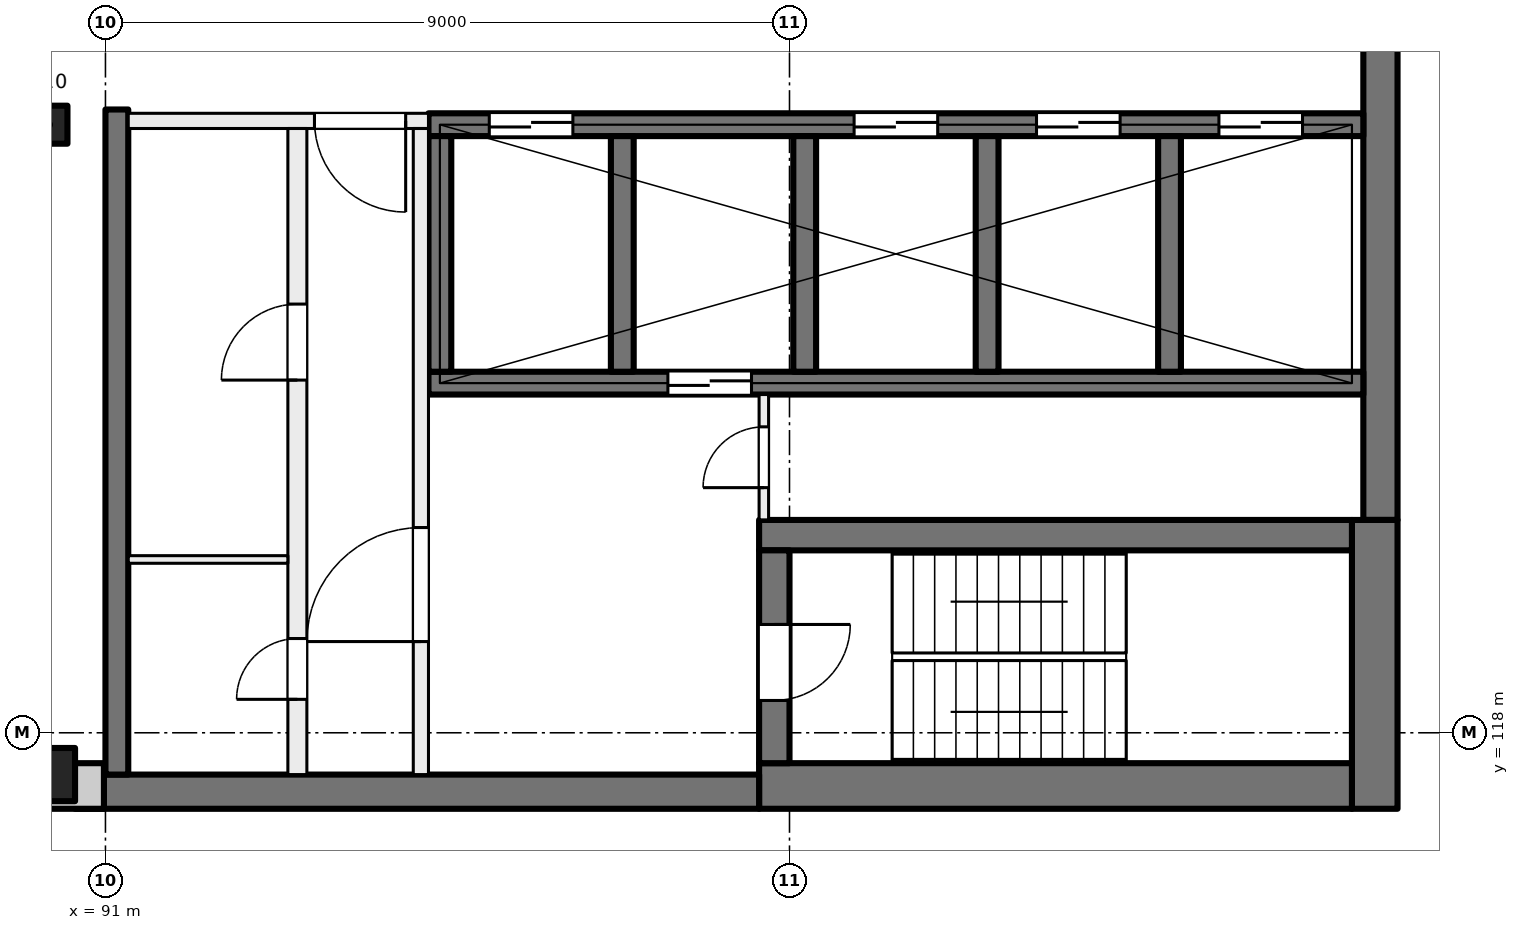
"""IFC4 building model, lengths in metres.
Left out: names, types, materials, properties, quantities, classifications, styles, units other than length and angle.
Written with IfcOpenShell. Run it as: python <this file> out.ifc"""

import sys

from ifc_helpers import new_model, si_unit, direction, frame, frame_2d, origin, origin_2d, place, context, subcontext, project, spatial, rectangle, extrude, element, fill, save


model = new_model("IFC4")
c1 = context("Model", 3, precision=1e-05, world=origin(), true_north=direction((0.0, 1.0)))
c2 = subcontext(c1, "Body", "Model", "MODEL_VIEW")
j1 = project(units=[si_unit("LENGTHUNIT", "METRE"), si_unit("PLANEANGLEUNIT", "RADIAN")], contexts=[c1])
p1 = place(None, origin())
s1 = spatial("IfcSite", under=j1, at=p1, CompositionType="ELEMENT")
p2 = place(p1, origin())
s2 = spatial("IfcBuilding", under=s1, at=p2, CompositionType="ELEMENT")
p3 = place(p2, frame((0.0, 0.0, 265.5)))
s3 = spatial("IfcBuildingStorey", under=s2, at=p3, CompositionType="ELEMENT", Elevation=265.5)
p4 = place(p3, frame((90.25, 126.0, 0.0), z_axis=(0.0, 0.0, 1.0), x_axis=(1.0, 0.0, 0.0)))
e1 = element("IfcColumn", 1, at=p4, inside=s3, PredefinedType="COLUMN", context=c2, shape_type="SweptSolid", body=[
    extrude(rectangle(XDim=0.5, YDim=0.5, at=origin_2d()), origin(), (0.0, 0.0, 1.0), 4.0),
])
p5 = place(p3, frame((90.25, 117.45, 0.0), z_axis=(0.0, 0.0, 1.0), x_axis=(1.0, 0.0, 0.0)))
e2 = element("IfcColumn", 2, at=p5, inside=s3, PredefinedType="COLUMN", context=c2, shape_type="SweptSolid", body=[
    extrude(rectangle(XDim=0.7, YDim=0.7, at=origin_2d()), origin(), (0.0, 0.0, 1.0), 4.0),
])
p6 = place(p3, frame((107.775, 135.2, 0.0), z_axis=(0.0, 0.0, 1.0), x_axis=(0.0, -1.0, 0.0)))
e3 = element("IfcWall", 3, at=p6, inside=s3, PredefinedType="SHEAR", context=c2, shape_type="SweptSolid", body=[
    extrude(rectangle(XDim=14.4, YDim=0.45, at=frame_2d((7.2, 0.0))), origin(), (0.0, 0.0, 1.0), 4.0),
])
p7 = place(p3, frame((107.7, 120.8, 0.0), z_axis=(0.0, 0.0, 1.0), x_axis=(0.0, -1.0, 0.0)))
e4 = element("IfcWall", 4, at=p7, inside=s3, PredefinedType="SHEAR", context=c2, shape_type="SweptSolid", body=[
    extrude(rectangle(XDim=3.8, YDim=0.6, at=frame_2d((1.9, 0.0))), origin(), (0.0, 0.0, 1.0), 4.0),
])
p8 = place(p3, frame((107.4, 117.3, 0.0), z_axis=(0.0, 0.0, 1.0), x_axis=(-1.0, 0.0, 0.0)))
e5 = element("IfcWall", 5, at=p8, inside=s3, PredefinedType="SHEAR", context=c2, shape_type="SweptSolid", body=[
    extrude(rectangle(XDim=7.8, YDim=0.6, at=frame_2d((3.9, 0.0))), origin(), (0.0, 0.0, 1.0), 4.0),
])
p9 = place(p3, frame((99.6, 117.225, 0.0), z_axis=(0.0, 0.0, 1.0), x_axis=(-1.0, 0.0, 0.0)))
e6 = element("IfcWall", 6, at=p9, inside=s3, PredefinedType="SHEAR", context=c2, shape_type="SweptSolid", body=[
    extrude(rectangle(XDim=9.0, YDim=0.45, at=frame_2d((4.5, 0.0))), origin(), (0.0, 0.0, 1.0), 4.0),
])
p10 = place(p3, frame((107.4, 120.6, 0.0), z_axis=(0.0, 0.0, 1.0), x_axis=(-1.0, 0.0, 0.0)))
e7 = element("IfcWall", 7, at=p10, inside=s3, PredefinedType="SHEAR", context=c2, shape_type="SweptSolid", body=[
    extrude(rectangle(XDim=7.8, YDim=0.4, at=frame_2d((3.9, 0.0))), origin(), (0.0, 0.0, 1.0), 4.0),
])
p11 = place(p3, frame((99.8, 120.4, 0.0), z_axis=(0.0, 0.0, 1.0), x_axis=(0.0, -1.0, 0.0)))
e8 = element("IfcWall", 8, at=p11, inside=s3, PredefinedType="SHEAR", context=c2, shape_type="SweptSolid", body=[
    extrude(rectangle(XDim=2.8, YDim=0.4, at=frame_2d((1.4, 0.0))), origin(), (0.0, 0.0, 1.0), 4.0),
])
p12 = place(p11, frame((0.975, 0.0, 0.0)))
e9 = element("IfcOpeningElement", 9, at=p12, cuts=e8, PredefinedType="OPENING", context=c2, shape_type="SweptSolid", body=[
    extrude(rectangle(XDim=1.0, YDim=2.1, at=frame_2d((0.5, 1.05))), frame((0.0, 0.21, 0.0), z_axis=(0.0, -1.0, 0.0), x_axis=(1.0, 0.0, 0.0)), (0.0, 0.0, 1.0), 0.42),
])
p13 = place(p3, frame((107.55, 126.0, 0.0), z_axis=(0.0, 0.0, 1.0), x_axis=(-1.0, 0.0, 0.0)))
e10 = element("IfcWall", 10, at=p13, inside=s3, PredefinedType="SHEAR", context=c2, shape_type="SweptSolid", body=[
    extrude(rectangle(XDim=12.3, YDim=0.3, at=frame_2d((6.15, 0.0))), origin(), (0.0, 0.0, 1.0), 4.0),
])
p14 = place(p13, frame((0.8, 0.0, 0.0)))
e11 = element("IfcOpeningElement", 11, at=p14, cuts=e10, PredefinedType="OPENING", context=c2, shape_type="SweptSolid", body=[
    extrude(rectangle(XDim=1.1, YDim=2.1, at=frame_2d((0.55, 1.05))), frame((0.0, 0.16, 0.0), z_axis=(0.0, -1.0, 0.0), x_axis=(1.0, 0.0, 0.0)), (0.0, 0.0, 1.0), 0.32),
])
p15 = place(p13, frame((3.2, 0.0, 0.0)))
e12 = element("IfcOpeningElement", 12, at=p15, cuts=e10, PredefinedType="OPENING", context=c2, shape_type="SweptSolid", body=[
    extrude(rectangle(XDim=1.1, YDim=2.1, at=frame_2d((0.55, 1.05))), frame((0.0, 0.16, 0.0), z_axis=(0.0, -1.0, 0.0), x_axis=(1.0, 0.0, 0.0)), (0.0, 0.0, 1.0), 0.32),
])
p16 = place(p13, frame((5.6, 0.0, 0.0)))
e13 = element("IfcOpeningElement", 13, at=p16, cuts=e10, PredefinedType="OPENING", context=c2, shape_type="SweptSolid", body=[
    extrude(rectangle(XDim=1.1, YDim=2.1, at=frame_2d((0.55, 1.05))), frame((0.0, 0.16, 0.0), z_axis=(0.0, -1.0, 0.0), x_axis=(1.0, 0.0, 0.0)), (0.0, 0.0, 1.0), 0.32),
])
p17 = place(p13, frame((10.4, 0.0, 0.0)))
e14 = element("IfcOpeningElement", 14, at=p17, cuts=e10, PredefinedType="OPENING", context=c2, shape_type="SweptSolid", body=[
    extrude(rectangle(XDim=1.1, YDim=2.1, at=frame_2d((0.55, 1.05))), frame((0.0, 0.16, 0.0), z_axis=(0.0, -1.0, 0.0), x_axis=(1.0, 0.0, 0.0)), (0.0, 0.0, 1.0), 0.32),
])
p18 = place(p3, frame((107.55, 122.6, 0.0), z_axis=(0.0, 0.0, 1.0), x_axis=(-1.0, 0.0, 0.0)))
e15 = element("IfcWall", 15, at=p18, inside=s3, PredefinedType="SHEAR", context=c2, shape_type="SweptSolid", body=[
    extrude(rectangle(XDim=12.3, YDim=0.3, at=frame_2d((6.15, 0.0))), origin(), (0.0, 0.0, 1.0), 4.0),
])
p19 = place(p18, frame((8.05, 0.0, 0.0)))
e16 = element("IfcOpeningElement", 16, at=p19, cuts=e15, PredefinedType="OPENING", context=c2, shape_type="SweptSolid", body=[
    extrude(rectangle(XDim=1.1, YDim=2.1, at=frame_2d((0.55, 1.05))), frame((0.0, 0.16, 0.0), z_axis=(0.0, -1.0, 0.0), x_axis=(1.0, 0.0, 0.0)), (0.0, 0.0, 1.0), 0.32),
])
for number, where, z_axis, x_axis in (
    (17, (105.0, 125.85, 0.0), (0.0, 0.0, 1.0), (0.0, -1.0, 0.0)),
    (18, (102.6, 125.85, 0.0), (0.0, 0.0, 1.0), (0.0, -1.0, 0.0)),
    (19, (100.2, 125.85, 0.0), (0.0, 0.0, 1.0), (0.0, -1.0, 0.0)),
    (20, (97.8, 125.85, 0.0), (0.0, 0.0, 1.0), (0.0, -1.0, 0.0)),
    (21, (95.4, 125.85, 0.0), (0.0, 0.0, 1.0), (0.0, -1.0, 0.0)),
):
    element("IfcWall", number, at=place(p3, frame(where, z_axis=z_axis, x_axis=x_axis)), inside=s3, PredefinedType="SHEAR", context=c2, shape_type="SweptSolid", body=[
        extrude(rectangle(XDim=3.1, YDim=0.3, at=frame_2d((1.55, 0.0))), origin(), (0.0, 0.0, 1.0), 4.0),
    ])
p20 = place(p3, frame((91.15, 126.2, 0.0), z_axis=(0.0, 0.0, 1.0), x_axis=(0.0, -1.0, 0.0)))
e22 = element("IfcWall", 22, at=p20, inside=s3, PredefinedType="SHEAR", context=c2, shape_type="SweptSolid", body=[
    extrude(rectangle(XDim=8.75, YDim=0.3, at=frame_2d((4.375, 0.0))), origin(), (0.0, 0.0, 1.0), 4.0),
])
p21 = place(p3, frame((90.98, 117.3, 0.0), z_axis=(0.0, 0.0, 1.0), x_axis=(-1.0, 0.0, 0.0)))
e23 = element("IfcWall", 23, at=p21, inside=s3, PredefinedType="SOLIDWALL", context=c2, shape_type="SweptSolid", body=[
    extrude(rectangle(XDim=43.98, YDim=0.6, at=frame_2d((21.99, 0.0))), origin(), (0.0, 0.0, 1.0), 3.625),
])
p22 = place(p21, frame((1.48, 0.0, 0.9)))
e24 = element("IfcOpeningElement", 24, at=p22, cuts=e23, PredefinedType="OPENING", context=c2, shape_type="SweptSolid", body=[
    extrude(rectangle(XDim=3.0, YDim=2.4, at=frame_2d((1.5, 1.2))), frame((0.0, 0.31, 0.0), z_axis=(0.0, -1.0, 0.0), x_axis=(1.0, 0.0, 0.0)), (0.0, 0.0, 1.0), 0.62),
])
p23 = place(p21, frame((5.98, 0.0, 0.9)))
e25 = element("IfcOpeningElement", 25, at=p23, cuts=e23, PredefinedType="OPENING", context=c2, shape_type="SweptSolid", body=[
    extrude(rectangle(XDim=3.0, YDim=2.4, at=frame_2d((1.5, 1.2))), frame((0.0, 0.31, 0.0), z_axis=(0.0, -1.0, 0.0), x_axis=(1.0, 0.0, 0.0)), (0.0, 0.0, 1.0), 0.62),
])
p24 = place(p21, frame((10.48, 0.0, 0.9)))
e26 = element("IfcOpeningElement", 26, at=p24, cuts=e23, PredefinedType="OPENING", context=c2, shape_type="SweptSolid", body=[
    extrude(rectangle(XDim=3.0, YDim=2.4, at=frame_2d((1.5, 1.2))), frame((0.0, 0.31, 0.0), z_axis=(0.0, -1.0, 0.0), x_axis=(1.0, 0.0, 0.0)), (0.0, 0.0, 1.0), 0.62),
])
p25 = place(p21, frame((14.98, 0.0, 0.9)))
e27 = element("IfcOpeningElement", 27, at=p25, cuts=e23, PredefinedType="OPENING", context=c2, shape_type="SweptSolid", body=[
    extrude(rectangle(XDim=3.0, YDim=2.4, at=frame_2d((1.5, 1.2))), frame((0.0, 0.31, 0.0), z_axis=(0.0, -1.0, 0.0), x_axis=(1.0, 0.0, 0.0)), (0.0, 0.0, 1.0), 0.62),
])
p26 = place(p21, frame((20.08, 0.0, 0.0)))
e28 = element("IfcOpeningElement", 28, at=p26, cuts=e23, PredefinedType="OPENING", context=c2, shape_type="SweptSolid", body=[
    extrude(rectangle(XDim=1.8, YDim=2.4, at=frame_2d((0.9, 1.2))), frame((0.0, 0.31, 0.0), z_axis=(0.0, -1.0, 0.0), x_axis=(1.0, 0.0, 0.0)), (0.0, 0.0, 1.0), 0.62),
])
p27 = place(p21, frame((23.98, 0.0, 0.9)))
e29 = element("IfcOpeningElement", 29, at=p27, cuts=e23, PredefinedType="OPENING", context=c2, shape_type="SweptSolid", body=[
    extrude(rectangle(XDim=3.0, YDim=2.4, at=frame_2d((1.5, 1.2))), frame((0.0, 0.31, 0.0), z_axis=(0.0, -1.0, 0.0), x_axis=(1.0, 0.0, 0.0)), (0.0, 0.0, 1.0), 0.62),
])
p28 = place(p21, frame((28.48, 0.0, 0.9)))
e30 = element("IfcOpeningElement", 30, at=p28, cuts=e23, PredefinedType="OPENING", context=c2, shape_type="SweptSolid", body=[
    extrude(rectangle(XDim=3.0, YDim=2.4, at=frame_2d((1.5, 1.2))), frame((0.0, 0.31, 0.0), z_axis=(0.0, -1.0, 0.0), x_axis=(1.0, 0.0, 0.0)), (0.0, 0.0, 1.0), 0.62),
])
p29 = place(p21, frame((33.58, 0.0, 0.0)))
e31 = element("IfcOpeningElement", 31, at=p29, cuts=e23, PredefinedType="OPENING", context=c2, shape_type="SweptSolid", body=[
    extrude(rectangle(XDim=1.8, YDim=2.4, at=frame_2d((0.9, 1.2))), frame((0.0, 0.31, 0.0), z_axis=(0.0, -1.0, 0.0), x_axis=(1.0, 0.0, 0.0)), (0.0, 0.0, 1.0), 0.62),
])
p30 = place(p21, frame((37.48, 0.0, 0.9)))
e32 = element("IfcOpeningElement", 32, at=p30, cuts=e23, PredefinedType="OPENING", context=c2, shape_type="SweptSolid", body=[
    extrude(rectangle(XDim=3.0, YDim=2.4, at=frame_2d((1.5, 1.2))), frame((0.0, 0.31, 0.0), z_axis=(0.0, -1.0, 0.0), x_axis=(1.0, 0.0, 0.0)), (0.0, 0.0, 1.0), 0.62),
])
p31 = place(p3, frame((95.25, 126.05, 0.0), z_axis=(0.0, 0.0, 1.0), x_axis=(-1.0, 0.0, 0.0)))
e33 = element("IfcWall", 33, at=p31, inside=s3, PredefinedType="PARTITIONING", context=c2, shape_type="SweptSolid", body=[
    extrude(rectangle(XDim=3.95, YDim=0.2, at=frame_2d((1.975, 0.0))), origin(), (0.0, 0.0, 1.0), 3.625),
])
p32 = place(p31, frame((0.3, 0.0, 0.0)))
e34 = element("IfcOpeningElement", 34, at=p32, cuts=e33, PredefinedType="OPENING", context=c2, shape_type="SweptSolid", body=[
    extrude(rectangle(XDim=1.2, YDim=2.1, at=frame_2d((0.6, 1.05))), frame((0.0, 0.11, 0.0), z_axis=(0.0, -1.0, 0.0), x_axis=(1.0, 0.0, 0.0)), (0.0, 0.0, 1.0), 0.22),
])
p33 = place(p3, frame((95.15, 117.45, 0.0), z_axis=(0.0, 0.0, 1.0), x_axis=(0.0, 1.0, 0.0)))
e35 = element("IfcWall", 35, at=p33, inside=s3, PredefinedType="PARTITIONING", context=c2, shape_type="SweptSolid", body=[
    extrude(rectangle(XDim=8.5, YDim=0.2, at=frame_2d((4.25, 0.0))), origin(), (0.0, 0.0, 1.0), 3.625),
])
p34 = place(p33, frame((1.75, 0.0, 0.0)))
e36 = element("IfcOpeningElement", 36, at=p34, cuts=e35, PredefinedType="OPENING", context=c2, shape_type="SweptSolid", body=[
    extrude(rectangle(XDim=1.5, YDim=2.1, at=frame_2d((0.75, 1.05))), frame((0.0, 0.11, 0.0), z_axis=(0.0, -1.0, 0.0), x_axis=(1.0, 0.0, 0.0)), (0.0, 0.0, 1.0), 0.22),
])
p35 = place(p3, frame((93.525, 117.45, 0.0), z_axis=(0.0, 0.0, 1.0), x_axis=(0.0, 1.0, 0.0)))
e37 = element("IfcWall", 37, at=p35, inside=s3, PredefinedType="PARTITIONING", context=c2, shape_type="SweptSolid", body=[
    extrude(rectangle(XDim=8.5, YDim=0.25, at=frame_2d((4.25, 0.0))), origin(), (0.0, 0.0, 1.0), 3.625),
])
p36 = place(p35, frame((5.19, 0.0, 0.0)))
e38 = element("IfcOpeningElement", 38, at=p36, cuts=e37, PredefinedType="OPENING", context=c2, shape_type="SweptSolid", body=[
    extrude(rectangle(XDim=1.0, YDim=2.1, at=frame_2d((0.5, 1.05))), frame((0.0, 0.135, 0.0), z_axis=(0.0, -1.0, 0.0), x_axis=(1.0, 0.0, 0.0)), (0.0, 0.0, 1.0), 0.27),
])
p37 = place(p35, frame((0.99, 0.0, 0.0)))
e39 = element("IfcOpeningElement", 39, at=p37, cuts=e37, PredefinedType="OPENING", context=c2, shape_type="SweptSolid", body=[
    extrude(rectangle(XDim=0.8, YDim=2.1, at=frame_2d((0.4, 1.05))), frame((0.0, 0.135, 0.0), z_axis=(0.0, -1.0, 0.0), x_axis=(1.0, 0.0, 0.0)), (0.0, 0.0, 1.0), 0.27),
])
p38 = place(p3, frame((99.663, 120.8, 0.0), z_axis=(0.0, 0.0, 1.0), x_axis=(0.0, 1.0, 0.0)))
e40 = element("IfcWall", 40, at=p38, inside=s3, PredefinedType="PARTITIONING", context=c2, shape_type="SweptSolid", body=[
    extrude(rectangle(XDim=1.65, YDim=0.125, at=frame_2d((0.825, 0.0))), origin(), (0.0, 0.0, 1.0), 3.625),
])
p39 = place(p38, frame((0.425, 0.0, 0.0)))
e41 = element("IfcOpeningElement", 41, at=p39, cuts=e40, PredefinedType="OPENING", context=c2, shape_type="SweptSolid", body=[
    extrude(rectangle(XDim=0.8, YDim=2.1, at=frame_2d((0.4, 1.05))), frame((0.0, 0.073, 0.0), z_axis=(0.0, -1.0, 0.0), x_axis=(1.0, 0.0, 0.0)), (0.0, 0.0, 1.0), 0.145),
])
p40 = place(p3, frame((93.4, 120.28, 0.0), z_axis=(0.0, 0.0, 1.0), x_axis=(-1.0, 0.0, 0.0)))
e42 = element("IfcWall", 42, at=p40, inside=s3, PredefinedType="PARTITIONING", context=c2, shape_type="SweptSolid", body=[
    extrude(rectangle(XDim=2.1, YDim=0.1, at=frame_2d((1.05, 0.0))), origin(), (0.0, 0.0, 1.0), 3.625),
])
p41 = place(p14, origin())
e43 = element("IfcDoor", 43, at=p41, inside=s3, OperationType="DOUBLE_DOOR_SLIDING", PredefinedType="DOOR", context=c2, shape_type="SweptSolid", body=[
    extrude(rectangle(XDim=1.1, YDim=2.1, at=frame_2d((0.55, 1.05))), frame((0.0, 0.025, 0.0), z_axis=(0.0, -1.0, 0.0), x_axis=(1.0, 0.0, 0.0)), (0.0, 0.0, 1.0), 0.05),
])
fill(e11, e43)
p42 = place(p15, origin())
e44 = element("IfcDoor", 44, at=p42, inside=s3, OperationType="DOUBLE_DOOR_SLIDING", PredefinedType="DOOR", context=c2, shape_type="SweptSolid", body=[
    extrude(rectangle(XDim=1.1, YDim=2.1, at=frame_2d((0.55, 1.05))), frame((0.0, 0.025, 0.0), z_axis=(0.0, -1.0, 0.0), x_axis=(1.0, 0.0, 0.0)), (0.0, 0.0, 1.0), 0.05),
])
fill(e12, e44)
p43 = place(p16, origin())
e45 = element("IfcDoor", 45, at=p43, inside=s3, OperationType="DOUBLE_DOOR_SLIDING", PredefinedType="DOOR", context=c2, shape_type="SweptSolid", body=[
    extrude(rectangle(XDim=1.1, YDim=2.1, at=frame_2d((0.55, 1.05))), frame((0.0, 0.025, 0.0), z_axis=(0.0, -1.0, 0.0), x_axis=(1.0, 0.0, 0.0)), (0.0, 0.0, 1.0), 0.05),
])
fill(e13, e45)
p44 = place(p17, origin())
e46 = element("IfcDoor", 46, at=p44, inside=s3, OperationType="DOUBLE_DOOR_SLIDING", PredefinedType="DOOR", context=c2, shape_type="SweptSolid", body=[
    extrude(rectangle(XDim=1.1, YDim=2.1, at=frame_2d((0.55, 1.05))), frame((0.0, 0.025, 0.0), z_axis=(0.0, -1.0, 0.0), x_axis=(1.0, 0.0, 0.0)), (0.0, 0.0, 1.0), 0.05),
])
fill(e14, e46)
p45 = place(p32, origin())
e47 = element("IfcDoor", 47, at=p45, inside=s3, OperationType="DOUBLE_DOOR_SINGLE_SWING", PredefinedType="DOOR", context=c2, shape_type="SweptSolid", body=[
    extrude(rectangle(XDim=1.2, YDim=2.1, at=frame_2d((0.6, 1.05))), frame((0.0, 0.025, 0.0), z_axis=(0.0, -1.0, 0.0), x_axis=(1.0, 0.0, 0.0)), (0.0, 0.0, 1.0), 0.05),
])
fill(e34, e47)
p46 = place(p34, origin())
e48 = element("IfcDoor", 48, at=p46, inside=s3, OperationType="DOUBLE_DOOR_SINGLE_SWING", PredefinedType="DOOR", context=c2, shape_type="SweptSolid", body=[
    extrude(rectangle(XDim=1.5, YDim=2.1, at=frame_2d((0.75, 1.05))), frame((0.0, 0.025, 0.0), z_axis=(0.0, -1.0, 0.0), x_axis=(1.0, 0.0, 0.0)), (0.0, 0.0, 1.0), 0.05),
])
fill(e36, e48)
p47 = place(p12, origin())
e49 = element("IfcDoor", 49, at=p47, inside=s3, OperationType="SINGLE_SWING_LEFT", PredefinedType="DOOR", context=c2, shape_type="SweptSolid", body=[
    extrude(rectangle(XDim=1.0, YDim=2.1, at=frame_2d((0.5, 1.05))), frame((0.0, 0.025, 0.0), z_axis=(0.0, -1.0, 0.0), x_axis=(1.0, 0.0, 0.0)), (0.0, 0.0, 1.0), 0.05),
])
fill(e9, e49)
p48 = place(p39, origin())
e50 = element("IfcDoor", 50, at=p48, inside=s3, OperationType="SINGLE_SWING_RIGHT", PredefinedType="DOOR", context=c2, shape_type="SweptSolid", body=[
    extrude(rectangle(XDim=0.8, YDim=2.1, at=frame_2d((0.4, 1.05))), frame((0.0, 0.025, 0.0), z_axis=(0.0, -1.0, 0.0), x_axis=(1.0, 0.0, 0.0)), (0.0, 0.0, 1.0), 0.05),
])
fill(e41, e50)
p49 = place(p36, origin())
e51 = element("IfcDoor", 51, at=p49, inside=s3, OperationType="SINGLE_SWING_LEFT", PredefinedType="DOOR", context=c2, shape_type="SweptSolid", body=[
    extrude(rectangle(XDim=1.0, YDim=2.1, at=frame_2d((0.5, 1.05))), frame((0.0, 0.025, 0.0), z_axis=(0.0, -1.0, 0.0), x_axis=(1.0, 0.0, 0.0)), (0.0, 0.0, 1.0), 0.05),
])
fill(e38, e51)
p50 = place(p37, origin())
e52 = element("IfcDoor", 52, at=p50, inside=s3, OperationType="SINGLE_SWING_RIGHT", PredefinedType="DOOR", context=c2, shape_type="SweptSolid", body=[
    extrude(rectangle(XDim=0.8, YDim=2.1, at=frame_2d((0.4, 1.05))), frame((0.0, 0.025, 0.0), z_axis=(0.0, -1.0, 0.0), x_axis=(1.0, 0.0, 0.0)), (0.0, 0.0, 1.0), 0.05),
])
fill(e39, e52)
p51 = place(p19, origin())
e53 = element("IfcDoor", 53, at=p51, inside=s3, OperationType="DOUBLE_DOOR_SLIDING", PredefinedType="DOOR", context=c2, shape_type="SweptSolid", body=[
    extrude(rectangle(XDim=1.1, YDim=2.1, at=frame_2d((0.55, 1.05))), frame((0.0, 0.025, 0.0), z_axis=(0.0, -1.0, 0.0), x_axis=(1.0, 0.0, 0.0)), (0.0, 0.0, 1.0), 0.05),
])
fill(e16, e53)
save(model, sys.argv[1])
